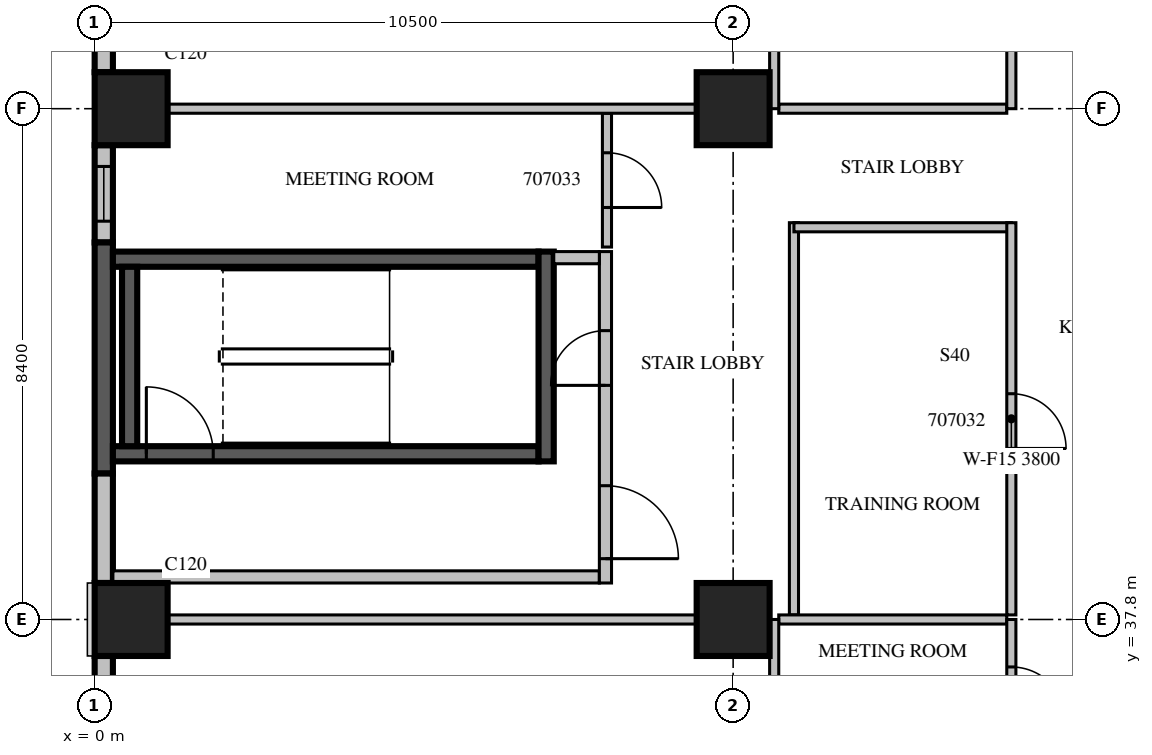
"""IFC4 building model, lengths in metres.
Left out: names, types, materials, properties, quantities, classifications, styles, units other than length and angle.
Written with IfcOpenShell. Run it as: python <this file> out.ifc"""

import sys

from ifc_helpers import new_model, si_unit, direction, frame, frame_2d, origin, origin_2d, place, context, subcontext, project, spatial, rectangle, extrude, source, transform, mapped, element, fill, save


model = new_model("IFC4")
c1 = context("Model", 3, precision=1e-05, world=origin(), true_north=direction((0.0, 1.0)))
c2 = subcontext(c1, "Body", "Model", "MODEL_VIEW")
j1 = project(units=[si_unit("LENGTHUNIT", "METRE"), si_unit("PLANEANGLEUNIT", "RADIAN")], contexts=[c1])
p1 = place(None, origin())
s1 = spatial("IfcSite", under=j1, at=p1, CompositionType="ELEMENT")
p2 = place(p1, origin())
s2 = spatial("IfcBuilding", under=s1, at=p2, CompositionType="ELEMENT")
p3 = place(p2, frame((0.0, 0.0, 40.5)))
s3 = spatial("IfcBuildingStorey", under=s2, at=p3, CompositionType="ELEMENT", Elevation=40.5)
m1 = source(origin(), c2, "Body", "SweptSolid", [
    extrude(rectangle(XDim=1.2, YDim=1.2, at=origin_2d()), origin(), (0.0, 0.0, 1.0), 4.2),
])
for number, where, z_axis, x_axis in (
    (1, (0.6, 37.8, 0.0), (0.0, 0.0, 1.0), (1.0, 0.0, 0.0)),
    (2, (10.5, 37.8, 0.0), (0.0, 0.0, 1.0), (1.0, 0.0, 0.0)),
    (3, (0.6, 46.2, 0.0), (0.0, 0.0, 1.0), (1.0, 0.0, 0.0)),
    (4, (10.5, 46.2, 0.0), (0.0, 0.0, 1.0), (1.0, 0.0, 0.0)),
):
    element("IfcColumn", number, at=place(p3, frame(where, z_axis=z_axis, x_axis=x_axis)), inside=s3, PredefinedType="COLUMN", context=c2, shape_type="MappedRepresentation", body=[
        mapped(m1, transform((0.0, 0.0, 0.0), scale=1.0)),
    ])
m2 = source(origin(), c2, "Body", "SweptSolid", [
    extrude(rectangle(XDim=4.68, YDim=0.3, at=frame_2d((2.34, 0.0))), origin(), (0.0, 0.0, 1.0), 3.3),
])
p4 = place(p3, frame((0.15, 51.48, 0.0), z_axis=(0.0, 0.0, 1.0), x_axis=(0.0, -1.0, 0.0)))
e5 = element("IfcWall", 5, at=p4, inside=s3, PredefinedType="STANDARD", context=c2, shape_type="MappedRepresentation", body=[
    mapped(m2, transform((0.0, 0.0, 0.0), scale=1.0)),
])
m3 = source(origin(), c2, "Body", "SweptSolid", [
    extrude(rectangle(XDim=3.6, YDim=2.7, at=frame_2d((1.8, 1.35))), frame((0.0, 0.16, 0.0), z_axis=(0.0, -1.0, 0.0), x_axis=(1.0, 0.0, 0.0)), (0.0, 0.0, 1.0), 0.32),
])
p5 = place(p4, frame((0.54, 0.0, 0.6)))
e6 = element("IfcOpeningElement", 6, at=p5, cuts=e5, PredefinedType="OPENING", context=c2, shape_type="MappedRepresentation", body=[
    mapped(m3, transform((0.0, 0.0, 0.0), scale=1.0)),
])
m4 = source(origin(), c2, "Body", "SweptSolid", [
    extrude(rectangle(XDim=1.6, YDim=0.3, at=frame_2d((0.8, 0.0))), origin(), (0.0, 0.0, 1.0), 3.8),
])
p6 = place(p3, frame((0.15, 45.6, 0.0), z_axis=(0.0, 0.0, 1.0), x_axis=(0.0, -1.0, 0.0)))
e7 = element("IfcWall", 7, at=p6, inside=s3, PredefinedType="STANDARD", context=c2, shape_type="MappedRepresentation", body=[
    mapped(m4, transform((0.0, 0.0, 0.0), scale=1.0)),
])
m5 = source(origin(), c2, "Body", "SweptSolid", [
    extrude(rectangle(XDim=0.9, YDim=2.7, at=frame_2d((0.45, 1.35))), frame((0.0, 0.16, 0.0), z_axis=(0.0, -1.0, 0.0), x_axis=(1.0, 0.0, 0.0)), (0.0, 0.0, 1.0), 0.32),
])
p7 = place(p6, frame((0.35, 0.0, 0.6)))
e8 = element("IfcOpeningElement", 8, at=p7, cuts=e7, PredefinedType="OPENING", context=c2, shape_type="MappedRepresentation", body=[
    mapped(m5, transform((0.0, 0.0, 0.0), scale=1.0)),
])
m6 = source(origin(), c2, "Body", "SweptSolid", [
    extrude(rectangle(XDim=3.8, YDim=0.3, at=frame_2d((1.9, 0.0))), origin(), (0.0, 0.0, 1.0), 3.8),
])
p8 = place(p3, frame((0.15, 44.0, 0.0), z_axis=(0.0, 0.0, 1.0), x_axis=(0.0, -1.0, 0.0)))
e9 = element("IfcWall", 9, at=p8, inside=s3, PredefinedType="SOLIDWALL", context=c2, shape_type="MappedRepresentation", body=[
    mapped(m6, transform((0.0, 0.0, 0.0), scale=1.0)),
])
m7 = source(origin(), c2, "Body", "SweptSolid", [
    extrude(rectangle(XDim=1.8, YDim=0.3, at=frame_2d((0.9, 0.0))), origin(), (0.0, 0.0, 1.0), 3.8),
])
p9 = place(p3, frame((0.15, 40.2, 0.0), z_axis=(0.0, 0.0, 1.0), x_axis=(0.0, -1.0, 0.0)))
e10 = element("IfcWall", 10, at=p9, inside=s3, PredefinedType="STANDARD", context=c2, shape_type="MappedRepresentation", body=[
    mapped(m7, transform((0.0, 0.0, 0.0), scale=1.0)),
])
m8 = source(origin(), c2, "Body", "SweptSolid", [
    extrude(rectangle(XDim=7.2, YDim=0.3, at=frame_2d((3.6, 0.0))), origin(), (0.0, 0.0, 1.0), 3.8),
])
p10 = place(p3, frame((0.15, 37.2, 0.0), z_axis=(0.0, 0.0, 1.0), x_axis=(0.0, -1.0, 0.0)))
e11 = element("IfcWall", 11, at=p10, inside=s3, PredefinedType="STANDARD", context=c2, shape_type="MappedRepresentation", body=[
    mapped(m8, transform((0.0, 0.0, 0.0), scale=1.0)),
])
m9 = source(origin(), c2, "Body", "SweptSolid", [
    extrude(rectangle(XDim=1.8, YDim=2.7, at=frame_2d((0.9, 1.35))), frame((0.0, 0.16, 0.0), z_axis=(0.0, -1.0, 0.0), x_axis=(1.0, 0.0, 0.0)), (0.0, 0.0, 1.0), 0.32),
])
p11 = place(p10, frame((0.738, 0.0, 0.6)))
e12 = element("IfcOpeningElement", 12, at=p11, cuts=e11, PredefinedType="OPENING", context=c2, shape_type="MappedRepresentation", body=[
    mapped(m9, transform((0.0, 0.0, 0.0), scale=1.0)),
])
m10 = source(origin(), c2, "Body", "SweptSolid", [
    extrude(rectangle(XDim=2.4, YDim=2.7, at=frame_2d((1.2, 1.35))), frame((0.0, 0.16, 0.0), z_axis=(0.0, -1.0, 0.0), x_axis=(1.0, 0.0, 0.0)), (0.0, 0.0, 1.0), 0.32),
])
p12 = place(p10, frame((3.7, 0.0, 0.6)))
e13 = element("IfcOpeningElement", 13, at=p12, cuts=e11, PredefinedType="OPENING", context=c2, shape_type="MappedRepresentation", body=[
    mapped(m10, transform((0.0, 0.0, 0.0), scale=1.0)),
])
m11 = source(origin(), c2, "Body", "SweptSolid", [
    extrude(rectangle(XDim=7.0, YDim=0.25, at=frame_2d((3.5, 0.0))), origin(), (0.0, 0.0, 1.0), 3.8),
])
p13 = place(p3, frame((0.3, 40.525, 0.0), z_axis=(0.0, 0.0, 1.0), x_axis=(1.0, 0.0, 0.0)))
e14 = element("IfcWall", 14, at=p13, inside=s3, PredefinedType="SOLIDWALL", context=c2, shape_type="MappedRepresentation", body=[
    mapped(m11, transform((0.0, 0.0, 0.0), scale=1.0)),
])
m12 = source(origin(), c2, "Body", "SweptSolid", [
    extrude(rectangle(XDim=1.1, YDim=2.1, at=frame_2d((0.55, 1.05))), frame((0.0, 0.135, 0.0), z_axis=(0.0, -1.0, 0.0), x_axis=(1.0, 0.0, 0.0)), (0.0, 0.0, 1.0), 0.27),
])
p14 = place(p13, frame((0.55, 0.0, 0.0)))
e15 = element("IfcOpeningElement", 15, at=p14, cuts=e14, PredefinedType="OPENING", context=c2, shape_type="MappedRepresentation", body=[
    mapped(m12, transform((0.0, 0.0, 0.0), scale=1.0)),
])
p15 = place(p3, frame((0.3, 43.725, 0.0), z_axis=(0.0, 0.0, 1.0), x_axis=(1.0, 0.0, 0.0)))
e16 = element("IfcWall", 16, at=p15, inside=s3, PredefinedType="SOLIDWALL", context=c2, shape_type="MappedRepresentation", body=[
    mapped(m11, transform((0.0, 0.0, 0.0), scale=1.0)),
])
m13 = source(origin(), c2, "Body", "SweptSolid", [
    extrude(rectangle(XDim=3.45, YDim=0.25, at=frame_2d((1.725, 0.0))), origin(), (0.0, 0.0, 1.0), 3.8),
])
p16 = place(p3, frame((7.425, 40.4, 0.0), z_axis=(0.0, 0.0, 1.0), x_axis=(0.0, 1.0, 0.0)))
e17 = element("IfcWall", 17, at=p16, inside=s3, PredefinedType="SOLIDWALL", context=c2, shape_type="MappedRepresentation", body=[
    mapped(m13, transform((0.0, 0.0, 0.0), scale=1.0)),
])
m14 = source(origin(), c2, "Body", "SweptSolid", [
    extrude(rectangle(XDim=2.95, YDim=0.25, at=frame_2d((1.475, 0.0))), origin(), (0.0, 0.0, 1.0), 3.8),
])
p17 = place(p3, frame((0.575, 40.65, 0.0), z_axis=(0.0, 0.0, 1.0), x_axis=(0.0, 1.0, 0.0)))
e18 = element("IfcWall", 18, at=p17, inside=s3, PredefinedType="SOLIDWALL", context=c2, shape_type="MappedRepresentation", body=[
    mapped(m14, transform((0.0, 0.0, 0.0), scale=1.0)),
])
m15 = source(origin(), c2, "Body", "SweptSolid", [
    extrude(rectangle(XDim=8.0, YDim=0.2, at=frame_2d((4.0, 0.0))), origin(), (0.0, 0.0, 1.0), 3.8),
])
p18 = place(p3, frame((0.3, 38.5, 0.0), z_axis=(0.0, 0.0, 1.0), x_axis=(1.0, 0.0, 0.0)))
e19 = element("IfcWall", 19, at=p18, inside=s3, PredefinedType="PARTITIONING", context=c2, shape_type="MappedRepresentation", body=[
    mapped(m15, transform((0.0, 0.0, 0.0), scale=1.0)),
])
m16 = source(origin(), c2, "Body", "SweptSolid", [
    extrude(rectangle(XDim=5.45, YDim=0.2, at=frame_2d((2.725, 0.0))), origin(), (0.0, 0.0, 1.0), 3.8),
])
p19 = place(p3, frame((8.4, 38.4, 0.0), z_axis=(0.0, 0.0, 1.0), x_axis=(0.0, 1.0, 0.0)))
e20 = element("IfcWall", 20, at=p19, inside=s3, PredefinedType="PARTITIONING", context=c2, shape_type="MappedRepresentation", body=[
    mapped(m16, transform((0.0, 0.0, 0.0), scale=1.0)),
])
m17 = source(origin(), c2, "Body", "SweptSolid", [
    extrude(rectangle(XDim=1.2, YDim=2.1, at=frame_2d((0.6, 1.05))), frame((0.0, 0.11, 0.0), z_axis=(0.0, -1.0, 0.0), x_axis=(1.0, 0.0, 0.0)), (0.0, 0.0, 1.0), 0.22),
])
p20 = place(p19, frame((0.4, 0.0, 0.0)))
e21 = element("IfcOpeningElement", 21, at=p20, cuts=e20, PredefinedType="OPENING", context=c2, shape_type="MappedRepresentation", body=[
    mapped(m17, transform((0.0, 0.0, 0.0), scale=1.0)),
])
m18 = source(origin(), c2, "Body", "SweptSolid", [
    extrude(rectangle(XDim=0.9, YDim=2.1, at=frame_2d((0.45, 1.05))), frame((0.0, 0.11, 0.0), z_axis=(0.0, -1.0, 0.0), x_axis=(1.0, 0.0, 0.0)), (0.0, 0.0, 1.0), 0.22),
])
p21 = place(p19, frame((3.25, 0.0, 0.0)))
e22 = element("IfcOpeningElement", 22, at=p21, cuts=e20, PredefinedType="OPENING", context=c2, shape_type="MappedRepresentation", body=[
    mapped(m18, transform((0.0, 0.0, 0.0), scale=1.0)),
])
m19 = source(origin(), c2, "Body", "SweptSolid", [
    extrude(rectangle(XDim=0.75, YDim=0.2, at=frame_2d((0.375, 0.0))), origin(), (0.0, 0.0, 1.0), 3.8),
])
p22 = place(p3, frame((7.55, 43.75, 0.0), z_axis=(0.0, 0.0, 1.0), x_axis=(1.0, 0.0, 0.0)))
e23 = element("IfcWall", 23, at=p22, inside=s3, PredefinedType="PARTITIONING", context=c2, shape_type="MappedRepresentation", body=[
    mapped(m19, transform((0.0, 0.0, 0.0), scale=1.0)),
])
m20 = source(origin(), c2, "Body", "SweptSolid", [
    extrude(rectangle(XDim=6.45, YDim=0.15, at=frame_2d((3.225, 0.0))), origin(), (0.0, 0.0, 1.0), 3.8),
])
p23 = place(p3, frame((11.5, 44.325, 0.0), z_axis=(0.0, 0.0, 1.0), x_axis=(0.0, -1.0, 0.0)))
e24 = element("IfcWall", 24, at=p23, inside=s3, PredefinedType="PARTITIONING", context=c2, shape_type="MappedRepresentation", body=[
    mapped(m20, transform((0.0, 0.0, 0.0), scale=1.0)),
])
p24 = place(p3, frame((15.075, 44.25, 0.0), z_axis=(0.0, 0.0, 1.0), x_axis=(-1.0, 0.0, 0.0)))
e25 = element("IfcWall", 25, at=p24, inside=s3, PredefinedType="PARTITIONING", context=c2, shape_type="SweptSolid", body=[
    extrude(rectangle(XDim=3.575, YDim=0.15, at=frame_2d((1.788, 0.0))), origin(), (0.0, 0.0, 1.0), 3.8),
])
p25 = place(p3, frame((15.075, 37.875, 0.0), z_axis=(0.0, 0.0, 1.0), x_axis=(0.0, 1.0, 0.0)))
e26 = element("IfcWall", 26, at=p25, inside=s3, PredefinedType="PARTITIONING", context=c2, shape_type="MappedRepresentation", body=[
    mapped(m20, transform((0.0, 0.0, 0.0), scale=1.0)),
])
m21 = source(origin(), c2, "Body", "SweptSolid", [
    extrude(rectangle(XDim=0.9, YDim=2.1, at=frame_2d((0.45, 1.05))), frame((0.0, 0.085, 0.0), z_axis=(0.0, -1.0, 0.0), x_axis=(1.0, 0.0, 0.0)), (0.0, 0.0, 1.0), 0.17),
])
p26 = place(p25, frame((2.737, 0.0, 0.0)))
e27 = element("IfcOpeningElement", 27, at=p26, cuts=e26, PredefinedType="OPENING", context=c2, shape_type="MappedRepresentation", body=[
    mapped(m21, transform((0.0, 0.0, 0.0), scale=1.0)),
])
m22 = source(origin(), c2, "Body", "SweptSolid", [
    extrude(rectangle(XDim=2.2, YDim=0.15, at=frame_2d((1.1, 0.0))), origin(), (0.0, 0.0, 1.0), 3.8),
])
p27 = place(p3, frame((8.425, 43.925, 0.0), z_axis=(0.0, 0.0, 1.0), x_axis=(0.0, 1.0, 0.0)))
e28 = element("IfcWall", 28, at=p27, inside=s3, PredefinedType="PARTITIONING", context=c2, shape_type="MappedRepresentation", body=[
    mapped(m22, transform((0.0, 0.0, 0.0), scale=1.0)),
])
p28 = place(p27, frame((0.65, 0.0, 0.0)))
e29 = element("IfcOpeningElement", 29, at=p28, cuts=e28, PredefinedType="OPENING", context=c2, shape_type="MappedRepresentation", body=[
    mapped(m21, transform((0.0, 0.0, 0.0), scale=1.0)),
])
m23 = source(origin(), c2, "Body", "SweptSolid", [
    extrude(rectangle(XDim=8.702, YDim=0.15, at=frame_2d((4.351, 0.0))), origin(), (0.0, 0.0, 1.0), 3.8),
])
p29 = place(p3, frame((9.901, 37.8, 0.0), z_axis=(0.0, 0.0, 1.0), x_axis=(-1.0, 0.0, 0.0)))
e30 = element("IfcWall", 30, at=p29, inside=s3, PredefinedType="PARTITIONING", context=c2, shape_type="MappedRepresentation", body=[
    mapped(m23, transform((0.0, 0.0, 0.0), scale=1.0)),
])
m24 = source(origin(), c2, "Body", "SweptSolid", [
    extrude(rectangle(XDim=3.75, YDim=0.15, at=frame_2d((1.875, 0.0))), origin(), (0.0, 0.0, 1.0), 3.8),
])
p30 = place(p3, frame((15.0, 37.8, 0.0), z_axis=(0.0, 0.0, 1.0), x_axis=(-1.0, 0.0, 0.0)))
e31 = element("IfcWall", 31, at=p30, inside=s3, PredefinedType="PARTITIONING", context=c2, shape_type="MappedRepresentation", body=[
    mapped(m24, transform((0.0, 0.0, 0.0), scale=1.0)),
])
m25 = source(origin(), c2, "Body", "SweptSolid", [
    extrude(rectangle(XDim=8.4, YDim=0.15, at=frame_2d((4.2, 0.0))), origin(), (0.0, 0.0, 1.0), 3.8),
])
p31 = place(p3, frame((11.175, 29.4, 0.0), z_axis=(0.0, 0.0, 1.0), x_axis=(0.0, 1.0, 0.0)))
e32 = element("IfcWall", 32, at=p31, inside=s3, PredefinedType="PARTITIONING", context=c2, shape_type="MappedRepresentation", body=[
    mapped(m25, transform((0.0, 0.0, 0.0), scale=1.0)),
])
m26 = source(origin(), c2, "Body", "SweptSolid", [
    extrude(rectangle(XDim=1.1, YDim=2.1, at=frame_2d((0.55, 1.05))), frame((0.0, 0.085, 0.0), z_axis=(0.0, -1.0, 0.0), x_axis=(1.0, 0.0, 0.0)), (0.0, 0.0, 1.0), 0.17),
])
p32 = place(p31, frame((1.467, 0.0, 0.0)))
e33 = element("IfcOpeningElement", 33, at=p32, cuts=e32, PredefinedType="OPENING", context=c2, shape_type="MappedRepresentation", body=[
    mapped(m26, transform((0.0, 0.0, 0.0), scale=1.0)),
])
p33 = place(p3, frame((9.901, 46.2, 0.0), z_axis=(0.0, 0.0, 1.0), x_axis=(-1.0, 0.0, 0.0)))
e34 = element("IfcWall", 34, at=p33, inside=s3, PredefinedType="PARTITIONING", context=c2, shape_type="MappedRepresentation", body=[
    mapped(m23, transform((0.0, 0.0, 0.0), scale=1.0)),
])
p34 = place(p3, frame((15.0, 46.2, 0.0), z_axis=(0.0, 0.0, 1.0), x_axis=(-1.0, 0.0, 0.0)))
e35 = element("IfcWall", 35, at=p34, inside=s3, PredefinedType="PARTITIONING", context=c2, shape_type="MappedRepresentation", body=[
    mapped(m24, transform((0.0, 0.0, 0.0), scale=1.0)),
])
p35 = place(p3, frame((11.175, 46.2, 0.0), z_axis=(0.0, 0.0, 1.0), x_axis=(0.0, 1.0, 0.0)))
e36 = element("IfcWall", 36, at=p35, inside=s3, PredefinedType="PARTITIONING", context=c2, shape_type="SweptSolid", body=[
    extrude(rectangle(XDim=19.02, YDim=0.15, at=frame_2d((9.51, 0.0))), origin(), (0.0, 0.0, 1.0), 3.3),
])
p36 = place(p35, frame((1.46, 0.0, 0.0)))
e37 = element("IfcOpeningElement", 37, at=p36, cuts=e36, PredefinedType="OPENING", context=c2, shape_type="MappedRepresentation", body=[
    mapped(m26, transform((0.0, 0.0, 0.0), scale=1.0)),
])
p37 = place(p3, frame((15.075, 29.4, 0.0), z_axis=(0.0, 0.0, 1.0), x_axis=(0.0, 1.0, 0.0)))
e38 = element("IfcWall", 38, at=p37, inside=s3, PredefinedType="PARTITIONING", context=c2, shape_type="MappedRepresentation", body=[
    mapped(m25, transform((0.0, 0.0, 0.0), scale=1.0)),
])
p38 = place(p37, frame((1.154, 0.0, 0.0)))
e39 = element("IfcOpeningElement", 39, at=p38, cuts=e38, PredefinedType="OPENING", context=c2, shape_type="MappedRepresentation", body=[
    mapped(m26, transform((0.0, 0.0, 0.0), scale=1.0)),
])
p39 = place(p37, frame((4.224, 0.0, 0.0)))
e40 = element("IfcOpeningElement", 40, at=p39, cuts=e38, PredefinedType="OPENING", context=c2, shape_type="MappedRepresentation", body=[
    mapped(m21, transform((0.0, 0.0, 0.0), scale=1.0)),
])
p40 = place(p37, frame((6.719, 0.0, 0.0)))
e41 = element("IfcOpeningElement", 41, at=p40, cuts=e38, PredefinedType="OPENING", context=c2, shape_type="MappedRepresentation", body=[
    mapped(m21, transform((0.0, 0.0, 0.0), scale=1.0)),
])
m27 = source(origin(), c2, "Body", "SweptSolid", [
    extrude(rectangle(XDim=19.02, YDim=0.15, at=frame_2d((9.51, 0.0))), origin(), (0.0, 0.0, 1.0), 3.3),
])
p41 = place(p3, frame((15.075, 46.2, 0.0), z_axis=(0.0, 0.0, 1.0), x_axis=(0.0, 1.0, 0.0)))
e42 = element("IfcWall", 42, at=p41, inside=s3, PredefinedType="PARTITIONING", context=c2, shape_type="MappedRepresentation", body=[
    mapped(m27, transform((0.0, 0.0, 0.0), scale=1.0)),
])
p42 = place(p41, frame((1.148, 0.0, 0.0)))
e43 = element("IfcOpeningElement", 43, at=p42, cuts=e42, PredefinedType="OPENING", context=c2, shape_type="MappedRepresentation", body=[
    mapped(m26, transform((0.0, 0.0, 0.0), scale=1.0)),
])
p43 = place(p41, frame((4.234, 0.0, 0.0)))
e44 = element("IfcOpeningElement", 44, at=p43, cuts=e42, PredefinedType="OPENING", context=c2, shape_type="MappedRepresentation", body=[
    mapped(m21, transform((0.0, 0.0, 0.0), scale=1.0)),
])
p44 = place(p41, frame((6.738, 0.0, 0.0)))
e45 = element("IfcOpeningElement", 45, at=p44, cuts=e42, PredefinedType="OPENING", context=c2, shape_type="MappedRepresentation", body=[
    mapped(m21, transform((0.0, 0.0, 0.0), scale=1.0)),
])
p45 = place(p41, frame((8.92, 0.0, 0.0)))
e46 = element("IfcOpeningElement", 46, at=p45, cuts=e42, PredefinedType="OPENING", context=c2, shape_type="MappedRepresentation", body=[
    mapped(m21, transform((0.0, 0.0, 0.0), scale=1.0)),
])
p46 = place(p41, frame((10.598, 0.0, 0.0)))
e47 = element("IfcOpeningElement", 47, at=p46, cuts=e42, PredefinedType="OPENING", context=c2, shape_type="MappedRepresentation", body=[
    mapped(m21, transform((0.0, 0.0, 0.0), scale=1.0)),
])
p47 = place(p41, frame((17.097, 0.0, 0.0)))
e48 = element("IfcOpeningElement", 48, at=p47, cuts=e42, PredefinedType="OPENING", context=c2, shape_type="MappedRepresentation", body=[
    mapped(m26, transform((0.0, 0.0, 0.0), scale=1.0)),
])
p48 = place(p41, frame((13.529, 0.0, 0.0)))
e49 = element("IfcOpeningElement", 49, at=p48, cuts=e42, PredefinedType="OPENING", context=c2, shape_type="MappedRepresentation", body=[
    mapped(m21, transform((0.0, 0.0, 0.0), scale=1.0)),
])
m28 = source(origin(), c2, "Body", "SweptSolid", [
    extrude(rectangle(XDim=0.9, YDim=2.7, at=frame_2d((0.45, 1.35))), frame((0.0, 0.03, 0.0), z_axis=(0.0, -1.0, 0.0), x_axis=(1.0, 0.0, 0.0)), (0.0, 0.0, 1.0), 0.06),
])
p49 = place(p7, origin())
e50 = element("IfcWindow", 50, at=p49, inside=s3, PartitioningType="SINGLE_PANEL", PredefinedType="WINDOW", context=c2, shape_type="MappedRepresentation", body=[
    mapped(m28, transform((0.0, 0.0, 0.0), scale=1.0)),
])
fill(e8, e50)
m29 = source(origin(), c2, "Body", "SweptSolid", [
    extrude(rectangle(XDim=1.1, YDim=2.1, at=frame_2d((0.55, 1.05))), frame((0.0, 0.025, 0.0), z_axis=(0.0, -1.0, 0.0), x_axis=(1.0, 0.0, 0.0)), (0.0, 0.0, 1.0), 0.05),
])
p50 = place(p14, origin())
e51 = element("IfcDoor", 51, at=p50, inside=s3, OperationType="SINGLE_SWING_LEFT", PredefinedType="DOOR", context=c2, shape_type="MappedRepresentation", body=[
    mapped(m29, transform((0.0, 0.0, 0.0), scale=1.0)),
])
fill(e15, e51)
m30 = source(origin(), c2, "Body", "SweptSolid", [
    extrude(rectangle(XDim=1.2, YDim=2.1, at=frame_2d((0.6, 1.05))), frame((0.0, 0.025, 0.0), z_axis=(0.0, -1.0, 0.0), x_axis=(1.0, 0.0, 0.0)), (0.0, 0.0, 1.0), 0.05),
])
p51 = place(p20, origin())
e52 = element("IfcDoor", 52, at=p51, inside=s3, OperationType="SINGLE_SWING_RIGHT", PredefinedType="DOOR", context=c2, shape_type="MappedRepresentation", body=[
    mapped(m30, transform((0.0, 0.0, 0.0), scale=1.0)),
])
fill(e21, e52)
m31 = source(origin(), c2, "Body", "SweptSolid", [
    extrude(rectangle(XDim=0.9, YDim=2.1, at=frame_2d((0.45, 1.05))), frame((0.0, 0.025, 0.0), z_axis=(0.0, -1.0, 0.0), x_axis=(1.0, 0.0, 0.0)), (0.0, 0.0, 1.0), 0.05),
])
p52 = place(p21, origin())
e53 = element("IfcDoor", 53, at=p52, inside=s3, OperationType="SINGLE_SWING_LEFT", PredefinedType="DOOR", context=c2, shape_type="MappedRepresentation", body=[
    mapped(m31, transform((0.0, 0.0, 0.0), scale=1.0)),
])
fill(e22, e53)
p53 = place(p26, origin())
e54 = element("IfcDoor", 54, at=p53, inside=s3, OperationType="SINGLE_SWING_RIGHT", PredefinedType="DOOR", context=c2, shape_type="MappedRepresentation", body=[
    mapped(m31, transform((0.0, 0.0, 0.0), scale=1.0)),
])
fill(e27, e54)
p54 = place(p28, origin())
e55 = element("IfcDoor", 55, at=p54, inside=s3, OperationType="SINGLE_SWING_RIGHT", PredefinedType="DOOR", context=c2, shape_type="MappedRepresentation", body=[
    mapped(m31, transform((0.0, 0.0, 0.0), scale=1.0)),
])
fill(e29, e55)
p55 = place(p40, origin())
e56 = element("IfcDoor", 56, at=p55, inside=s3, OperationType="SINGLE_SWING_RIGHT", PredefinedType="DOOR", context=c2, shape_type="MappedRepresentation", body=[
    mapped(m31, transform((0.0, 0.0, 0.0), scale=1.0)),
])
fill(e41, e56)
save(model, sys.argv[1])
